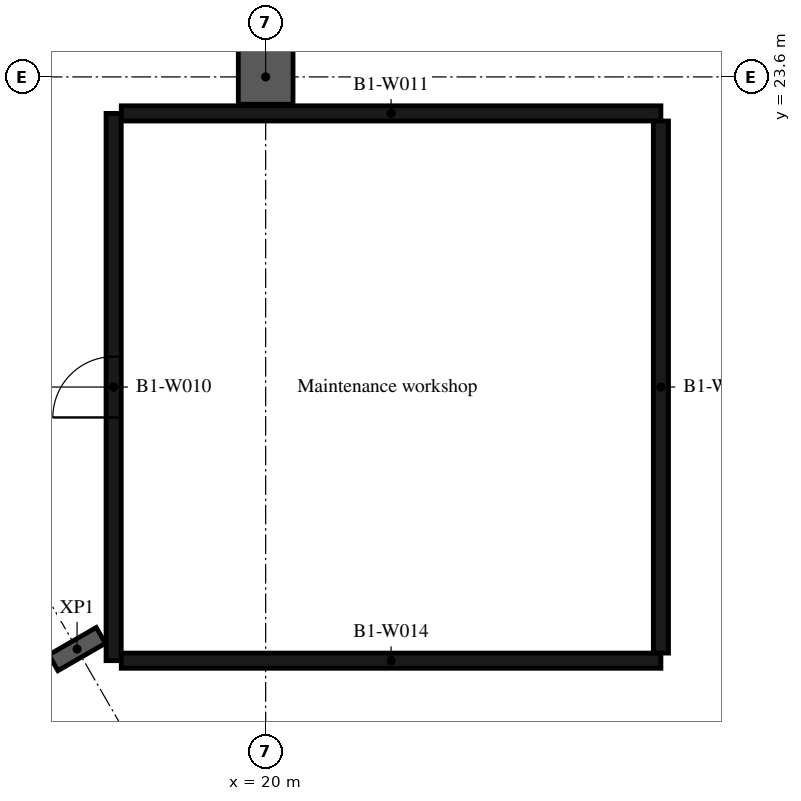
"""IFC4 building model, lengths in metres.
Left out: names, types, materials, properties, quantities, classifications, styles, units other than length and angle.
Written with IfcOpenShell. Run it as: python <this file> out.ifc"""

import sys

from ifc_helpers import new_model, si_unit, direction, frame, frame_2d, origin, origin_2d, place, context, subcontext, project, spatial, rectangle, i_section, extrude, element, fill, save


model = new_model("IFC4")
c1 = context("Model", 3, precision=1e-05, world=origin(), true_north=direction((0.0, 1.0)))
c2 = subcontext(c1, "Body", "Model", "MODEL_VIEW")
j1 = project(units=[si_unit("LENGTHUNIT", "METRE"), si_unit("PLANEANGLEUNIT", "RADIAN")], contexts=[c1])
p1 = place(None, origin())
s1 = spatial("IfcSite", under=j1, at=p1, CompositionType="ELEMENT")
p2 = place(p1, origin())
s2 = spatial("IfcBuilding", under=s1, at=p2, CompositionType="ELEMENT")
p3 = place(p2, frame((0.0, 0.0, -4.2)))
s3 = spatial("IfcBuildingStorey", under=s2, at=p3, CompositionType="ELEMENT", Elevation=-4.2)
p4 = place(p3, frame((20.0, 23.6, -0.38), z_axis=(0.0, 0.0, 1.0), x_axis=(1.0, 0.0, 0.0)))
e1 = element("IfcColumn", 1, at=p4, inside=s3, PredefinedType="COLUMN", context=c2, shape_type="SweptSolid", body=[
    extrude(rectangle(XDim=0.9, YDim=0.9, at=origin_2d()), origin(), (0.0, 0.0, 1.0), 3.88),
])
p5 = place(p3, frame((16.899, 14.19, -0.38), z_axis=(0.0, 0.0, 1.0), x_axis=(0.50000017485, -0.866025302835, 0.0)))
e2 = element("IfcColumn", 2, at=p5, inside=s3, PredefinedType="COLUMN", context=c2, shape_type="SweptSolid", body=[
    extrude(i_section(OverallWidth=0.3, OverallDepth=0.9, WebThickness=0.019, FlangeThickness=0.035, FilletRadius=0.03, at=origin_2d()), origin(), (0.0, 0.0, 1.0), 4.16),
])
p6 = place(p3, frame((17.5, 14.0, 0.0), z_axis=(0.0, 0.0, 1.0), x_axis=(0.0, 1.0, 0.0)))
e3 = element("IfcWall", 3, at=p6, inside=s3, PredefinedType="PARTITIONING", context=c2, shape_type="SweptSolid", body=[
    extrude(rectangle(XDim=9.0, YDim=0.25, at=frame_2d((4.5, 0.0))), origin(), (0.0, 0.0, 1.0), 3.5),
])
p7 = place(p6, frame((4.0, 0.0, 0.0)))
e4 = element("IfcOpeningElement", 4, at=p7, cuts=e3, PredefinedType="OPENING", context=c2, shape_type="SweptSolid", body=[
    extrude(rectangle(XDim=1.0, YDim=2.1, at=frame_2d((0.5, 1.05))), frame((0.0, 0.135, 0.0), z_axis=(0.0, -1.0, 0.0), x_axis=(1.0, 0.0, 0.0)), (0.0, 0.0, 1.0), 0.27),
])
for number, where, z_axis, x_axis in (
    (5, (17.625, 23.0, 0.0), (0.0, 0.0, 1.0), (1.0, 0.0, 0.0)),
    (6, (26.5, 14.0, 0.0), (0.0, 0.0, 1.0), (-1.0, 0.0, 0.0)),
):
    element("IfcWall", number, at=place(p3, frame(where, z_axis=z_axis, x_axis=x_axis)), inside=s3, PredefinedType="PARTITIONING", context=c2, shape_type="SweptSolid", body=[
        extrude(rectangle(XDim=8.875, YDim=0.25, at=frame_2d((4.438, 0.0))), origin(), (0.0, 0.0, 1.0), 3.5),
    ])
p8 = place(p3, frame((26.5, 22.875, 0.0), z_axis=(0.0, 0.0, 1.0), x_axis=(0.0, -1.0, 0.0)))
e7 = element("IfcWall", 7, at=p8, inside=s3, PredefinedType="PARTITIONING", context=c2, shape_type="SweptSolid", body=[
    extrude(rectangle(XDim=8.75, YDim=0.25, at=frame_2d((4.375, 0.0))), origin(), (0.0, 0.0, 1.0), 3.5),
])
p9 = place(p7, origin())
e8 = element("IfcDoor", 8, at=p9, inside=s3, OperationType="SINGLE_SWING_LEFT", PredefinedType="DOOR", context=c2, shape_type="SweptSolid", body=[
    extrude(rectangle(XDim=1.0, YDim=2.1, at=frame_2d((0.5, 1.05))), frame((0.0, 0.025, 0.0), z_axis=(0.0, -1.0, 0.0), x_axis=(1.0, 0.0, 0.0)), (0.0, 0.0, 1.0), 0.05),
])
fill(e4, e8)
save(model, sys.argv[1])
